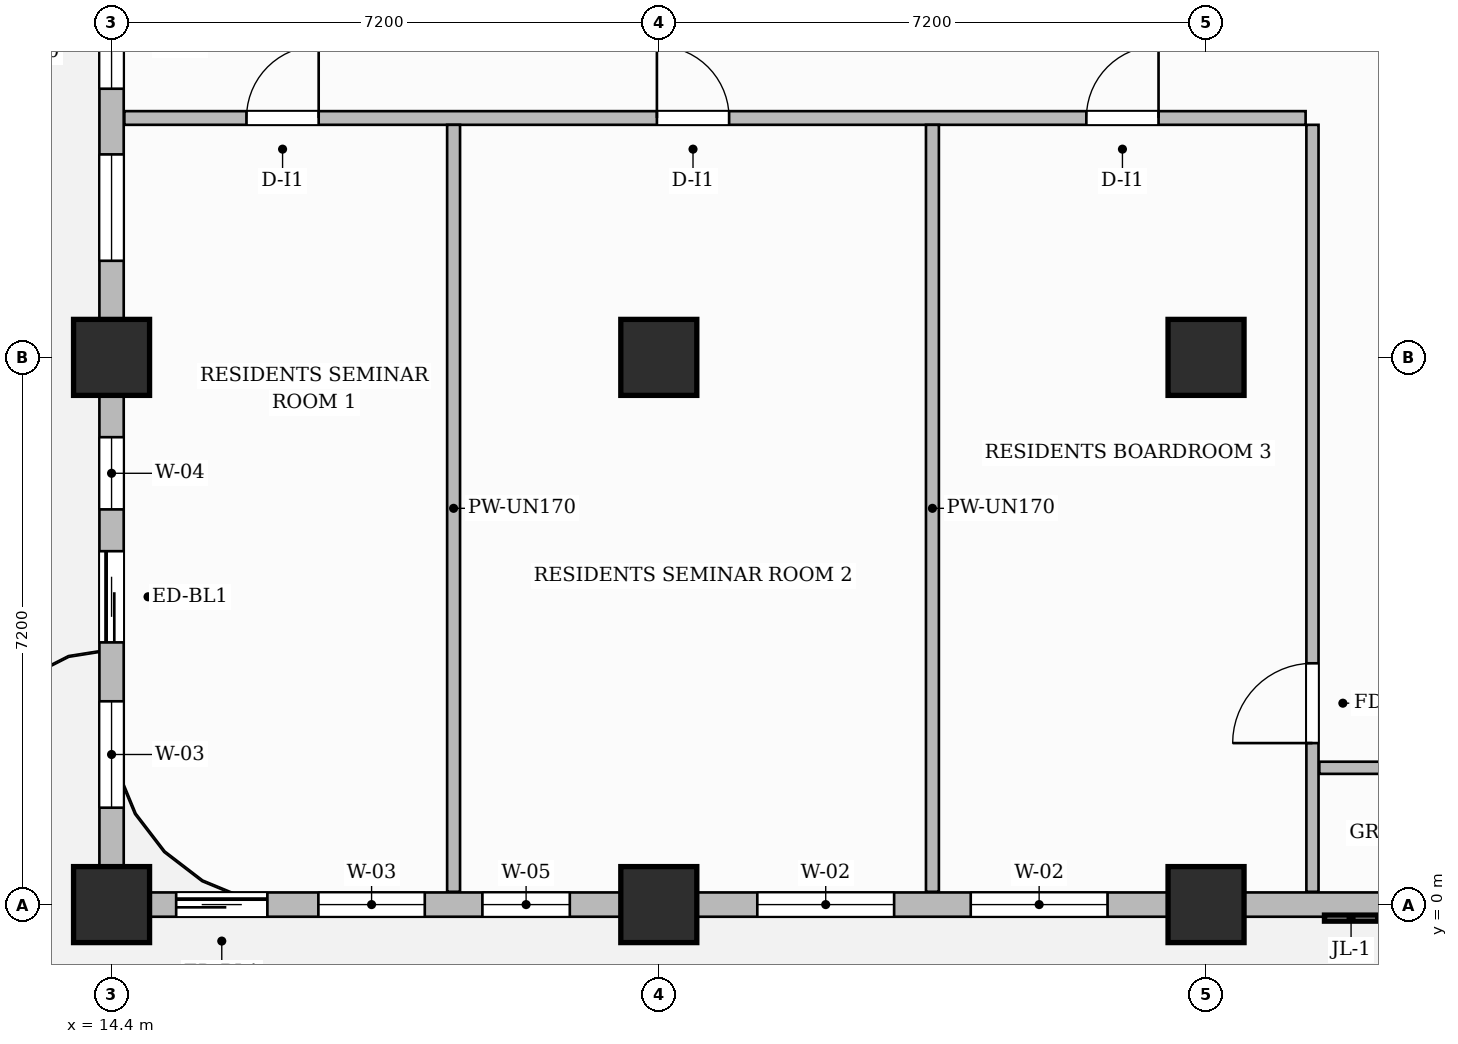
"""IFC4 building model, lengths in metres.
Left out: names, types, materials, properties, quantities, classifications, styles, units other than length and angle.
Written with IfcOpenShell. Run it as: python <this file> out.ifc"""

import sys

from ifc_helpers import new_model, si_unit, direction, frame, frame_2d, origin, origin_2d, place, context, subcontext, project, spatial, rectangle, extrude, source, transform, mapped, element, fill, save


model = new_model("IFC4")
c1 = context("Model", 3, precision=1e-05, world=origin(), true_north=direction((0.0, 1.0)))
c2 = subcontext(c1, "Body", "Model", "MODEL_VIEW")
j1 = project(units=[si_unit("LENGTHUNIT", "METRE"), si_unit("PLANEANGLEUNIT", "RADIAN")], contexts=[c1])
p1 = place(None, origin())
s1 = spatial("IfcSite", under=j1, at=p1, CompositionType="ELEMENT")
p2 = place(p1, origin())
s2 = spatial("IfcBuilding", under=s1, at=p2, CompositionType="ELEMENT")
p3 = place(p2, frame((0.0, 0.0, 184.95)))
s3 = spatial("IfcBuildingStorey", under=s2, at=p3, CompositionType="ELEMENT", Elevation=184.95)
m1 = source(origin(), c2, "Body", "SweptSolid", [
    extrude(rectangle(XDim=1.0, YDim=1.0, at=origin_2d()), origin(), (0.0, 0.0, 1.0), 3.85),
])
for number, where, z_axis, x_axis in (
    (1, (14.4, 0.0, 0.0), (0.0, 0.0, 1.0), (1.0, 0.0, 0.0)),
    (2, (14.4, 7.2, 0.0), (0.0, 0.0, 1.0), (1.0, 0.0, 0.0)),
    (3, (21.6, 0.0, 0.0), (0.0, 0.0, 1.0), (1.0, 0.0, 0.0)),
    (4, (21.6, 7.2, 0.0), (0.0, 0.0, 1.0), (1.0, 0.0, 0.0)),
    (5, (28.8, 0.0, 0.0), (0.0, 0.0, 1.0), (1.0, 0.0, 0.0)),
    (6, (28.8, 7.2, 0.0), (0.0, 0.0, 1.0), (1.0, 0.0, 0.0)),
):
    element("IfcColumn", number, at=place(p3, frame(where, z_axis=z_axis, x_axis=x_axis)), inside=s3, PredefinedType="COLUMN", context=c2, shape_type="MappedRepresentation", body=[
        mapped(m1, transform((0.0, 0.0, 0.0), scale=1.0)),
    ])
p4 = place(p3, frame((14.568, 10.35, 0.0), z_axis=(0.0, 0.0, 1.0), x_axis=(1.0, 0.0, 0.0)))
e7 = element("IfcWall", 7, at=p4, inside=s3, PredefinedType="PARTITIONING", context=c2, shape_type="SweptSolid", body=[
    extrude(rectangle(XDim=15.542, YDim=0.18, at=frame_2d((7.771, 0.0))), origin(), (0.0, 0.0, 1.0), 3.6),
])
p5 = place(p4, frame((1.607, 0.0, 0.0)))
e8 = element("IfcOpeningElement", 8, at=p5, cuts=e7, PredefinedType="OPENING", context=c2, shape_type="SweptSolid", body=[
    extrude(rectangle(XDim=0.95, YDim=2.15, at=frame_2d((0.475, 1.075))), frame((0.0, 0.1, 0.0), z_axis=(0.0, -1.0, 0.0), x_axis=(1.0, 0.0, 0.0)), (0.0, 0.0, 1.0), 0.2),
])
p6 = place(p4, frame((7.007, 0.0, 0.0)))
e9 = element("IfcOpeningElement", 9, at=p6, cuts=e7, PredefinedType="OPENING", context=c2, shape_type="SweptSolid", body=[
    extrude(rectangle(XDim=0.95, YDim=2.15, at=frame_2d((0.475, 1.075))), frame((0.0, 0.1, 0.0), z_axis=(0.0, -1.0, 0.0), x_axis=(1.0, 0.0, 0.0)), (0.0, 0.0, 1.0), 0.2),
])
p7 = place(p4, frame((12.657, 0.0, 0.0)))
e10 = element("IfcOpeningElement", 10, at=p7, cuts=e7, PredefinedType="OPENING", context=c2, shape_type="SweptSolid", body=[
    extrude(rectangle(XDim=0.95, YDim=2.15, at=frame_2d((0.475, 1.075))), frame((0.0, 0.1, 0.0), z_axis=(0.0, -1.0, 0.0), x_axis=(1.0, 0.0, 0.0)), (0.0, 0.0, 1.0), 0.2),
])
p8 = place(p3, frame((30.2, 0.168, 0.0), z_axis=(0.0, 0.0, 1.0), x_axis=(0.0, 1.0, 0.0)))
e11 = element("IfcWall", 11, at=p8, inside=s3, PredefinedType="PARTITIONING", context=c2, shape_type="SweptSolid", body=[
    extrude(rectangle(XDim=10.092, YDim=0.16, at=frame_2d((5.046, 0.0))), origin(), (0.0, 0.0, 1.0), 3.6),
])
p9 = place(p8, frame((1.957, 0.0, 0.0)))
e12 = element("IfcOpeningElement", 12, at=p9, cuts=e11, PredefinedType="OPENING", context=c2, shape_type="SweptSolid", body=[
    extrude(rectangle(XDim=1.05, YDim=2.15, at=frame_2d((0.525, 1.075))), frame((0.0, 0.09, 0.0), z_axis=(0.0, -1.0, 0.0), x_axis=(1.0, 0.0, 0.0)), (0.0, 0.0, 1.0), 0.18),
])
p10 = place(p3, frame((30.29, 1.8, 0.0), z_axis=(0.0, 0.0, 1.0), x_axis=(1.0, 0.0, 0.0)))
e13 = element("IfcWall", 13, at=p10, inside=s3, PredefinedType="PARTITIONING", context=c2, shape_type="SweptSolid", body=[
    extrude(rectangle(XDim=19.37, YDim=0.16, at=frame_2d((9.685, 0.0))), origin(), (0.0, 0.0, 1.0), 3.6),
])
p11 = place(p10, frame((5.074, 0.0, 0.0)))
e14 = element("IfcOpeningElement", 14, at=p11, cuts=e13, PredefinedType="OPENING", context=c2, shape_type="SweptSolid", body=[
    extrude(rectangle(XDim=0.9, YDim=2.15, at=frame_2d((0.45, 1.075))), frame((0.0, 0.09, 0.0), z_axis=(0.0, -1.0, 0.0), x_axis=(1.0, 0.0, 0.0)), (0.0, 0.0, 1.0), 0.18),
])
p12 = place(p10, frame((14.06, 0.0, 0.0)))
e15 = element("IfcOpeningElement", 15, at=p12, cuts=e13, PredefinedType="OPENING", context=c2, shape_type="SweptSolid", body=[
    extrude(rectangle(XDim=0.9, YDim=2.15, at=frame_2d((0.45, 1.075))), frame((0.0, 0.09, 0.0), z_axis=(0.0, -1.0, 0.0), x_axis=(1.0, 0.0, 0.0)), (0.0, 0.0, 1.0), 0.18),
])
p13 = place(p3, frame((18.9, 0.168, 0.0), z_axis=(0.0, 0.0, 1.0), x_axis=(0.0, 1.0, 0.0)))
e16 = element("IfcWall", 16, at=p13, inside=s3, PredefinedType="PARTITIONING", context=c2, shape_type="SweptSolid", body=[
    extrude(rectangle(XDim=10.092, YDim=0.17, at=frame_2d((5.046, 0.0))), origin(), (0.0, 0.0, 1.0), 3.6),
])
p14 = place(p3, frame((25.2, 0.168, 0.0), z_axis=(0.0, 0.0, 1.0), x_axis=(0.0, 1.0, 0.0)))
e17 = element("IfcWall", 17, at=p14, inside=s3, PredefinedType="PARTITIONING", context=c2, shape_type="SweptSolid", body=[
    extrude(rectangle(XDim=10.092, YDim=0.17, at=frame_2d((5.046, 0.0))), origin(), (0.0, 0.0, 1.0), 3.285),
])
p15 = place(p3, frame((14.4, 0.0, 0.0), z_axis=(0.0, 0.0, 1.0), x_axis=(1.0, 0.0, 0.0)))
e18 = element("IfcWall", 18, at=p15, inside=s3, PredefinedType="SOLIDWALL", context=c2, shape_type="SweptSolid", body=[
    extrude(rectangle(XDim=35.4, YDim=0.32, at=frame_2d((17.7, 0.0))), origin(), (0.0, 0.0, 1.0), 3.085),
])
p16 = place(p15, frame((0.85, 0.0, 0.0)))
e19 = element("IfcOpeningElement", 19, at=p16, cuts=e18, PredefinedType="OPENING", context=c2, shape_type="SweptSolid", body=[
    extrude(rectangle(XDim=1.2, YDim=2.2, at=frame_2d((0.6, 1.1))), frame((0.0, 0.17, 0.0), z_axis=(0.0, -1.0, 0.0), x_axis=(1.0, 0.0, 0.0)), (0.0, 0.0, 1.0), 0.34),
])
p17 = place(p15, frame((2.721, 0.0, 0.8)))
e20 = element("IfcOpeningElement", 20, at=p17, cuts=e18, PredefinedType="OPENING", context=c2, shape_type="SweptSolid", body=[
    extrude(rectangle(XDim=1.4, YDim=1.85, at=frame_2d((0.7, 0.925))), frame((0.0, 0.17, 0.0), z_axis=(0.0, -1.0, 0.0), x_axis=(1.0, 0.0, 0.0)), (0.0, 0.0, 1.0), 0.34),
])
p18 = place(p15, frame((4.879, 0.0, 0.8)))
e21 = element("IfcOpeningElement", 21, at=p18, cuts=e18, PredefinedType="OPENING", context=c2, shape_type="SweptSolid", body=[
    extrude(rectangle(XDim=1.15, YDim=1.8, at=frame_2d((0.575, 0.9))), frame((0.0, 0.17, 0.0), z_axis=(0.0, -1.0, 0.0), x_axis=(1.0, 0.0, 0.0)), (0.0, 0.0, 1.0), 0.34),
])
p19 = place(p15, frame((8.496, 0.0, 0.8)))
e22 = element("IfcOpeningElement", 22, at=p19, cuts=e18, PredefinedType="OPENING", context=c2, shape_type="SweptSolid", body=[
    extrude(rectangle(XDim=1.8, YDim=1.85, at=frame_2d((0.9, 0.925))), frame((0.0, 0.17, 0.0), z_axis=(0.0, -1.0, 0.0), x_axis=(1.0, 0.0, 0.0)), (0.0, 0.0, 1.0), 0.34),
])
p20 = place(p15, frame((11.304, 0.0, 0.8)))
e23 = element("IfcOpeningElement", 23, at=p20, cuts=e18, PredefinedType="OPENING", context=c2, shape_type="SweptSolid", body=[
    extrude(rectangle(XDim=1.8, YDim=1.85, at=frame_2d((0.9, 0.925))), frame((0.0, 0.17, 0.0), z_axis=(0.0, -1.0, 0.0), x_axis=(1.0, 0.0, 0.0)), (0.0, 0.0, 1.0), 0.34),
])
p21 = place(p15, frame((16.804, 0.0, 0.8)))
e24 = element("IfcOpeningElement", 24, at=p21, cuts=e18, PredefinedType="OPENING", context=c2, shape_type="SweptSolid", body=[
    extrude(rectangle(XDim=1.8, YDim=1.85, at=frame_2d((0.9, 0.925))), frame((0.0, 0.17, 0.0), z_axis=(0.0, -1.0, 0.0), x_axis=(1.0, 0.0, 0.0)), (0.0, 0.0, 1.0), 0.34),
])
p22 = place(p15, frame((22.396, 0.0, 0.8)))
e25 = element("IfcOpeningElement", 25, at=p22, cuts=e18, PredefinedType="OPENING", context=c2, shape_type="SweptSolid", body=[
    extrude(rectangle(XDim=1.8, YDim=1.85, at=frame_2d((0.9, 0.925))), frame((0.0, 0.17, 0.0), z_axis=(0.0, -1.0, 0.0), x_axis=(1.0, 0.0, 0.0)), (0.0, 0.0, 1.0), 0.34),
])
p23 = place(p15, frame((25.629, 0.0, 0.8)))
e26 = element("IfcOpeningElement", 26, at=p23, cuts=e18, PredefinedType="OPENING", context=c2, shape_type="SweptSolid", body=[
    extrude(rectangle(XDim=0.95, YDim=1.75, at=frame_2d((0.475, 0.875))), frame((0.0, 0.17, 0.0), z_axis=(0.0, -1.0, 0.0), x_axis=(1.0, 0.0, 0.0)), (0.0, 0.0, 1.0), 0.34),
])
p24 = place(p15, frame((29.075, 0.0, 0.8)))
e27 = element("IfcOpeningElement", 27, at=p24, cuts=e18, PredefinedType="OPENING", context=c2, shape_type="SweptSolid", body=[
    extrude(rectangle(XDim=1.8, YDim=1.85, at=frame_2d((0.9, 0.925))), frame((0.0, 0.17, 0.0), z_axis=(0.0, -1.0, 0.0), x_axis=(1.0, 0.0, 0.0)), (0.0, 0.0, 1.0), 0.34),
])
p25 = place(p15, frame((32.125, 0.0, 0.8)))
e28 = element("IfcOpeningElement", 28, at=p25, cuts=e18, PredefinedType="OPENING", context=c2, shape_type="SweptSolid", body=[
    extrude(rectangle(XDim=1.8, YDim=1.85, at=frame_2d((0.9, 0.925))), frame((0.0, 0.17, 0.0), z_axis=(0.0, -1.0, 0.0), x_axis=(1.0, 0.0, 0.0)), (0.0, 0.0, 1.0), 0.34),
])
p26 = place(p3, frame((14.4, 0.05, 0.0), z_axis=(0.0, 0.0, 1.0), x_axis=(0.0, 1.0, 0.0)))
e29 = element("IfcWall", 29, at=p26, inside=s3, PredefinedType="SOLIDWALL", context=c2, shape_type="SweptSolid", body=[
    extrude(rectangle(XDim=25.1, YDim=0.32, at=frame_2d((12.55, 0.0))), origin(), (0.0, 0.0, 1.0), 3.085),
])
p27 = place(p26, frame((3.4, 0.0, 0.0)))
e30 = element("IfcOpeningElement", 30, at=p27, cuts=e29, PredefinedType="OPENING", context=c2, shape_type="SweptSolid", body=[
    extrude(rectangle(XDim=1.2, YDim=2.2, at=frame_2d((0.6, 1.1))), frame((0.0, 0.17, 0.0), z_axis=(0.0, -1.0, 0.0), x_axis=(1.0, 0.0, 0.0)), (0.0, 0.0, 1.0), 0.34),
])
p28 = place(p26, frame((1.225, 0.0, 0.8)))
e31 = element("IfcOpeningElement", 31, at=p28, cuts=e29, PredefinedType="OPENING", context=c2, shape_type="SweptSolid", body=[
    extrude(rectangle(XDim=1.4, YDim=1.85, at=frame_2d((0.7, 0.925))), frame((0.0, 0.17, 0.0), z_axis=(0.0, -1.0, 0.0), x_axis=(1.0, 0.0, 0.0)), (0.0, 0.0, 1.0), 0.34),
])
p29 = place(p26, frame((5.15, 0.0, 0.8)))
e32 = element("IfcOpeningElement", 32, at=p29, cuts=e29, PredefinedType="OPENING", context=c2, shape_type="SweptSolid", body=[
    extrude(rectangle(XDim=0.95, YDim=1.75, at=frame_2d((0.475, 0.875))), frame((0.0, 0.17, 0.0), z_axis=(0.0, -1.0, 0.0), x_axis=(1.0, 0.0, 0.0)), (0.0, 0.0, 1.0), 0.34),
])
p30 = place(p26, frame((8.421, 0.0, 0.8)))
e33 = element("IfcOpeningElement", 33, at=p30, cuts=e29, PredefinedType="OPENING", context=c2, shape_type="SweptSolid", body=[
    extrude(rectangle(XDim=1.4, YDim=1.85, at=frame_2d((0.7, 0.925))), frame((0.0, 0.17, 0.0), z_axis=(0.0, -1.0, 0.0), x_axis=(1.0, 0.0, 0.0)), (0.0, 0.0, 1.0), 0.34),
])
p31 = place(p26, frame((10.685, 0.0, 0.8)))
e34 = element("IfcOpeningElement", 34, at=p31, cuts=e29, PredefinedType="OPENING", context=c2, shape_type="SweptSolid", body=[
    extrude(rectangle(XDim=1.15, YDim=1.8, at=frame_2d((0.575, 0.9))), frame((0.0, 0.17, 0.0), z_axis=(0.0, -1.0, 0.0), x_axis=(1.0, 0.0, 0.0)), (0.0, 0.0, 1.0), 0.34),
])
p32 = place(p26, frame((12.414, 0.0, 0.8)))
e35 = element("IfcOpeningElement", 35, at=p32, cuts=e29, PredefinedType="OPENING", context=c2, shape_type="SweptSolid", body=[
    extrude(rectangle(XDim=0.95, YDim=1.75, at=frame_2d((0.475, 0.875))), frame((0.0, 0.17, 0.0), z_axis=(0.0, -1.0, 0.0), x_axis=(1.0, 0.0, 0.0)), (0.0, 0.0, 1.0), 0.34),
])
p33 = place(p26, frame((15.675, 0.0, 0.8)))
e36 = element("IfcOpeningElement", 36, at=p33, cuts=e29, PredefinedType="OPENING", context=c2, shape_type="SweptSolid", body=[
    extrude(rectangle(XDim=1.8, YDim=1.85, at=frame_2d((0.9, 0.925))), frame((0.0, 0.17, 0.0), z_axis=(0.0, -1.0, 0.0), x_axis=(1.0, 0.0, 0.0)), (0.0, 0.0, 1.0), 0.34),
])
p34 = place(p26, frame((18.425, 0.0, 0.8)))
e37 = element("IfcOpeningElement", 37, at=p34, cuts=e29, PredefinedType="OPENING", context=c2, shape_type="SweptSolid", body=[
    extrude(rectangle(XDim=1.8, YDim=1.85, at=frame_2d((0.9, 0.925))), frame((0.0, 0.17, 0.0), z_axis=(0.0, -1.0, 0.0), x_axis=(1.0, 0.0, 0.0)), (0.0, 0.0, 1.0), 0.34),
])
p35 = place(p26, frame((22.65, 0.0, 0.8)))
e38 = element("IfcOpeningElement", 38, at=p35, cuts=e29, PredefinedType="OPENING", context=c2, shape_type="SweptSolid", body=[
    extrude(rectangle(XDim=1.4, YDim=1.85, at=frame_2d((0.7, 0.925))), frame((0.0, 0.17, 0.0), z_axis=(0.0, -1.0, 0.0), x_axis=(1.0, 0.0, 0.0)), (0.0, 0.0, 1.0), 0.34),
])
m2 = source(origin(), c2, "Body", "SweptSolid", [
    extrude(rectangle(XDim=1.05, YDim=2.15, at=frame_2d((0.525, 1.075))), frame((0.0, 0.025, 0.0), z_axis=(0.0, -1.0, 0.0), x_axis=(1.0, 0.0, 0.0)), (0.0, 0.0, 1.0), 0.05),
])
p36 = place(p9, origin())
e39 = element("IfcDoor", 39, at=p36, inside=s3, OperationType="SINGLE_SWING_LEFT", PredefinedType="DOOR", context=c2, shape_type="MappedRepresentation", body=[
    mapped(m2, transform((0.0, 0.0, 0.0), scale=1.0)),
])
fill(e12, e39)
m3 = source(origin(), c2, "Body", "SweptSolid", [
    extrude(rectangle(XDim=0.95, YDim=2.15, at=frame_2d((0.475, 1.075))), frame((0.0, 0.025, 0.0), z_axis=(0.0, -1.0, 0.0), x_axis=(1.0, 0.0, 0.0)), (0.0, 0.0, 1.0), 0.05),
])
p37 = place(p5, origin())
e40 = element("IfcDoor", 40, at=p37, inside=s3, OperationType="SINGLE_SWING_RIGHT", PredefinedType="DOOR", context=c2, shape_type="MappedRepresentation", body=[
    mapped(m3, transform((0.0, 0.0, 0.0), scale=1.0)),
])
fill(e8, e40)
p38 = place(p6, origin())
e41 = element("IfcDoor", 41, at=p38, inside=s3, OperationType="SINGLE_SWING_LEFT", PredefinedType="DOOR", context=c2, shape_type="MappedRepresentation", body=[
    mapped(m3, transform((0.0, 0.0, 0.0), scale=1.0)),
])
fill(e9, e41)
p39 = place(p7, origin())
e42 = element("IfcDoor", 42, at=p39, inside=s3, OperationType="SINGLE_SWING_RIGHT", PredefinedType="DOOR", context=c2, shape_type="MappedRepresentation", body=[
    mapped(m3, transform((0.0, 0.0, 0.0), scale=1.0)),
])
fill(e10, e42)
m4 = source(origin(), c2, "Body", "SweptSolid", [
    extrude(rectangle(XDim=1.2, YDim=2.2, at=frame_2d((0.6, 1.1))), frame((0.0, 0.025, 0.0), z_axis=(0.0, -1.0, 0.0), x_axis=(1.0, 0.0, 0.0)), (0.0, 0.0, 1.0), 0.05),
])
p40 = place(p16, origin())
e43 = element("IfcDoor", 43, at=p40, inside=s3, OperationType="SLIDING_TO_LEFT", PredefinedType="DOOR", context=c2, shape_type="MappedRepresentation", body=[
    mapped(m4, transform((0.0, 0.0, 0.0), scale=1.0)),
])
fill(e19, e43)
p41 = place(p27, origin())
e44 = element("IfcDoor", 44, at=p41, inside=s3, OperationType="SLIDING_TO_LEFT", PredefinedType="DOOR", context=c2, shape_type="MappedRepresentation", body=[
    mapped(m4, transform((0.0, 0.0, 0.0), scale=1.0)),
])
fill(e30, e44)
m5 = source(origin(), c2, "Body", "SweptSolid", [
    extrude(rectangle(XDim=1.4, YDim=1.85, at=frame_2d((0.7, 0.925))), frame((0.0, 0.03, 0.0), z_axis=(0.0, -1.0, 0.0), x_axis=(1.0, 0.0, 0.0)), (0.0, 0.0, 1.0), 0.06),
])
p42 = place(p17, origin())
e45 = element("IfcWindow", 45, at=p42, inside=s3, PartitioningType="SINGLE_PANEL", PredefinedType="WINDOW", context=c2, shape_type="MappedRepresentation", body=[
    mapped(m5, transform((0.0, 0.0, 0.0), scale=1.0)),
])
fill(e20, e45)
m6 = source(origin(), c2, "Body", "SweptSolid", [
    extrude(rectangle(XDim=1.15, YDim=1.8, at=frame_2d((0.575, 0.9))), frame((0.0, 0.03, 0.0), z_axis=(0.0, -1.0, 0.0), x_axis=(1.0, 0.0, 0.0)), (0.0, 0.0, 1.0), 0.06),
])
p43 = place(p18, origin())
e46 = element("IfcWindow", 46, at=p43, inside=s3, PartitioningType="SINGLE_PANEL", PredefinedType="WINDOW", context=c2, shape_type="MappedRepresentation", body=[
    mapped(m6, transform((0.0, 0.0, 0.0), scale=1.0)),
])
fill(e21, e46)
m7 = source(origin(), c2, "Body", "SweptSolid", [
    extrude(rectangle(XDim=1.8, YDim=1.85, at=frame_2d((0.9, 0.925))), frame((0.0, 0.03, 0.0), z_axis=(0.0, -1.0, 0.0), x_axis=(1.0, 0.0, 0.0)), (0.0, 0.0, 1.0), 0.06),
])
p44 = place(p19, origin())
e47 = element("IfcWindow", 47, at=p44, inside=s3, PartitioningType="DOUBLE_PANEL_VERTICAL", PredefinedType="WINDOW", context=c2, shape_type="MappedRepresentation", body=[
    mapped(m7, transform((0.0, 0.0, 0.0), scale=1.0)),
])
fill(e22, e47)
p45 = place(p20, origin())
e48 = element("IfcWindow", 48, at=p45, inside=s3, PartitioningType="DOUBLE_PANEL_VERTICAL", PredefinedType="WINDOW", context=c2, shape_type="MappedRepresentation", body=[
    mapped(m7, transform((0.0, 0.0, 0.0), scale=1.0)),
])
fill(e23, e48)
p46 = place(p28, origin())
e49 = element("IfcWindow", 49, at=p46, inside=s3, PartitioningType="SINGLE_PANEL", PredefinedType="WINDOW", context=c2, shape_type="MappedRepresentation", body=[
    mapped(m5, transform((0.0, 0.0, 0.0), scale=1.0)),
])
fill(e31, e49)
m8 = source(origin(), c2, "Body", "SweptSolid", [
    extrude(rectangle(XDim=0.95, YDim=1.75, at=frame_2d((0.475, 0.875))), frame((0.0, 0.03, 0.0), z_axis=(0.0, -1.0, 0.0), x_axis=(1.0, 0.0, 0.0)), (0.0, 0.0, 1.0), 0.06),
])
p47 = place(p29, origin())
e50 = element("IfcWindow", 50, at=p47, inside=s3, PartitioningType="SINGLE_PANEL", PredefinedType="WINDOW", context=c2, shape_type="MappedRepresentation", body=[
    mapped(m8, transform((0.0, 0.0, 0.0), scale=1.0)),
])
fill(e32, e50)
p48 = place(p30, origin())
e51 = element("IfcWindow", 51, at=p48, inside=s3, PartitioningType="SINGLE_PANEL", PredefinedType="WINDOW", context=c2, shape_type="MappedRepresentation", body=[
    mapped(m5, transform((0.0, 0.0, 0.0), scale=1.0)),
])
fill(e33, e51)
p49 = place(p31, origin())
e52 = element("IfcWindow", 52, at=p49, inside=s3, PartitioningType="SINGLE_PANEL", PredefinedType="WINDOW", context=c2, shape_type="MappedRepresentation", body=[
    mapped(m6, transform((0.0, 0.0, 0.0), scale=1.0)),
])
fill(e34, e52)
save(model, sys.argv[1])
